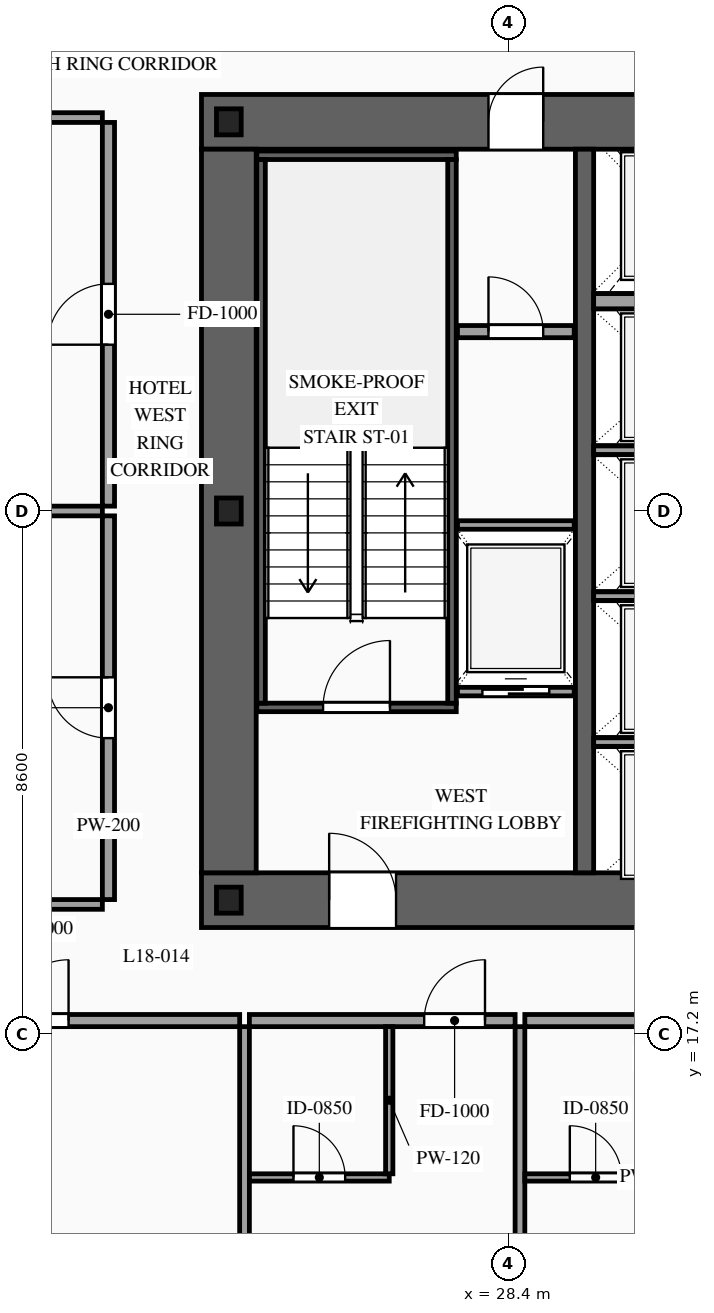
"""IFC4 building model, lengths in metres.
Left out: names, types, materials, properties, quantities, classifications, styles, units other than length and angle.
Written with IfcOpenShell. Run it as: python <this file> out.ifc"""

import sys

from ifc_helpers import new_model, si_unit, direction, frame, frame_2d, origin, origin_2d, place, context, subcontext, project, spatial, rectangle, i_section, extrude, source, transform, mapped, element, fill, save


model = new_model("IFC4")
c1 = context("Model", 3, precision=1e-05, world=origin(), true_north=direction((0.0, 1.0)))
c2 = subcontext(c1, "Body", "Model", "MODEL_VIEW")
j1 = project(units=[si_unit("LENGTHUNIT", "METRE"), si_unit("PLANEANGLEUNIT", "RADIAN")], contexts=[c1])
p1 = place(None, origin())
s1 = spatial("IfcSite", under=j1, at=p1, CompositionType="ELEMENT")
p2 = place(p1, origin())
s2 = spatial("IfcBuilding", under=s1, at=p2, CompositionType="ELEMENT")
p3 = place(p2, frame((0.0, 0.0, 71.2)))
s3 = spatial("IfcBuildingStorey", under=s2, at=p3, CompositionType="ELEMENT", Elevation=71.2)
p4 = place(p3, frame((23.35, 19.4, 0.0), z_axis=(0.0, 0.0, 1.0), x_axis=(1.0, 0.0, 0.0)))
e1 = element("IfcWall", 1, at=p4, inside=s3, PredefinedType="SHEAR", context=c2, shape_type="SweptSolid", body=[
    extrude(rectangle(XDim=27.3, YDim=0.9, at=frame_2d((13.65, 0.0))), origin(), (0.0, 0.0, 1.0), 3.6),
])
p5 = place(p4, frame((2.1, 0.0, 0.0)))
e2 = element("IfcOpeningElement", 2, at=p5, cuts=e1, PredefinedType="OPENING", context=c2, shape_type="SweptSolid", body=[
    extrude(rectangle(XDim=1.1, YDim=2.2, at=frame_2d((0.55, 1.1))), frame((0.0, 0.465, 0.0), z_axis=(0.0, -1.0, 0.0), x_axis=(1.0, 0.0, 0.0)), (0.0, 0.0, 1.0), 0.93),
])
p6 = place(p4, frame((10.0, 0.0, 0.0)))
e3 = element("IfcOpeningElement", 3, at=p6, cuts=e1, PredefinedType="OPENING", context=c2, shape_type="SweptSolid", body=[
    extrude(rectangle(XDim=1.1, YDim=2.2, at=frame_2d((0.55, 1.1))), frame((0.0, 0.465, 0.0), z_axis=(0.0, -1.0, 0.0), x_axis=(1.0, 0.0, 0.0)), (0.0, 0.0, 1.0), 0.93),
])
p7 = place(p4, frame((23.2, 0.0, 0.0)))
e4 = element("IfcOpeningElement", 4, at=p7, cuts=e1, PredefinedType="OPENING", context=c2, shape_type="SweptSolid", body=[
    extrude(rectangle(XDim=1.1, YDim=2.2, at=frame_2d((0.55, 1.1))), frame((0.0, 0.465, 0.0), z_axis=(0.0, -1.0, 0.0), x_axis=(1.0, 0.0, 0.0)), (0.0, 0.0, 1.0), 0.93),
])
p8 = place(p4, frame((19.82, 0.0, 0.0)))
e5 = element("IfcOpeningElement", 5, at=p8, cuts=e1, PredefinedType="OPENING", context=c2, shape_type="SweptSolid", body=[
    extrude(rectangle(XDim=0.9, YDim=2.15, at=frame_2d((0.45, 1.075))), frame((0.0, 0.465, 0.0), z_axis=(0.0, -1.0, 0.0), x_axis=(1.0, 0.0, 0.0)), (0.0, 0.0, 1.0), 0.93),
])
p9 = place(p4, frame((18.38, 0.0, 0.0)))
e6 = element("IfcOpeningElement", 6, at=p9, cuts=e1, PredefinedType="OPENING", context=c2, shape_type="SweptSolid", body=[
    extrude(rectangle(XDim=0.9, YDim=2.15, at=frame_2d((0.45, 1.075))), frame((0.0, 0.465, 0.0), z_axis=(0.0, -1.0, 0.0), x_axis=(1.0, 0.0, 0.0)), (0.0, 0.0, 1.0), 0.93),
])
p10 = place(p3, frame((23.35, 32.2, 0.0), z_axis=(0.0, 0.0, 1.0), x_axis=(1.0, 0.0, 0.0)))
e7 = element("IfcWall", 7, at=p10, inside=s3, PredefinedType="SHEAR", context=c2, shape_type="SweptSolid", body=[
    extrude(rectangle(XDim=27.3, YDim=0.9, at=frame_2d((13.65, 0.0))), origin(), (0.0, 0.0, 1.0), 3.6),
])
p11 = place(p10, frame((4.72, 0.0, 0.0)))
e8 = element("IfcOpeningElement", 8, at=p11, cuts=e7, PredefinedType="OPENING", context=c2, shape_type="SweptSolid", body=[
    extrude(rectangle(XDim=0.9, YDim=2.15, at=frame_2d((0.45, 1.075))), frame((0.0, 0.465, 0.0), z_axis=(0.0, -1.0, 0.0), x_axis=(1.0, 0.0, 0.0)), (0.0, 0.0, 1.0), 0.93),
])
p12 = place(p10, frame((10.0, 0.0, 0.0)))
e9 = element("IfcOpeningElement", 9, at=p12, cuts=e7, PredefinedType="OPENING", context=c2, shape_type="SweptSolid", body=[
    extrude(rectangle(XDim=1.1, YDim=2.2, at=frame_2d((0.55, 1.1))), frame((0.0, 0.465, 0.0), z_axis=(0.0, -1.0, 0.0), x_axis=(1.0, 0.0, 0.0)), (0.0, 0.0, 1.0), 0.93),
])
p13 = place(p10, frame((15.85, 0.0, 0.0)))
e10 = element("IfcOpeningElement", 10, at=p13, cuts=e7, PredefinedType="OPENING", context=c2, shape_type="SweptSolid", body=[
    extrude(rectangle(XDim=1.1, YDim=2.2, at=frame_2d((0.55, 1.1))), frame((0.0, 0.465, 0.0), z_axis=(0.0, -1.0, 0.0), x_axis=(1.0, 0.0, 0.0)), (0.0, 0.0, 1.0), 0.93),
])
p14 = place(p10, frame((18.38, 0.0, 0.0)))
e11 = element("IfcOpeningElement", 11, at=p14, cuts=e7, PredefinedType="OPENING", context=c2, shape_type="SweptSolid", body=[
    extrude(rectangle(XDim=0.9, YDim=2.15, at=frame_2d((0.45, 1.075))), frame((0.0, 0.465, 0.0), z_axis=(0.0, -1.0, 0.0), x_axis=(1.0, 0.0, 0.0)), (0.0, 0.0, 1.0), 0.93),
])
p15 = place(p10, frame((19.82, 0.0, 0.0)))
e12 = element("IfcOpeningElement", 12, at=p15, cuts=e7, PredefinedType="OPENING", context=c2, shape_type="SweptSolid", body=[
    extrude(rectangle(XDim=0.9, YDim=2.15, at=frame_2d((0.45, 1.075))), frame((0.0, 0.465, 0.0), z_axis=(0.0, -1.0, 0.0), x_axis=(1.0, 0.0, 0.0)), (0.0, 0.0, 1.0), 0.93),
])
m1 = source(origin(), c2, "Body", "SweptSolid", [
    extrude(rectangle(XDim=11.9, YDim=0.9, at=frame_2d((5.95, 0.0))), origin(), (0.0, 0.0, 1.0), 3.6),
])
p16 = place(p3, frame((23.8, 19.85, 0.0), z_axis=(0.0, 0.0, 1.0), x_axis=(0.0, 1.0, 0.0)))
e13 = element("IfcWall", 13, at=p16, inside=s3, PredefinedType="SHEAR", context=c2, shape_type="MappedRepresentation", body=[
    mapped(m1, transform((0.0, 0.0, 0.0), scale=1.0)),
])
m2 = source(origin(), c2, "Body", "SweptSolid", [
    extrude(rectangle(XDim=11.9, YDim=0.3, at=frame_2d((5.95, 0.0))), origin(), (0.0, 0.0, 1.0), 3.6),
])
p17 = place(p3, frame((29.65, 19.85, 0.0), z_axis=(0.0, 0.0, 1.0), x_axis=(0.0, 1.0, 0.0)))
e14 = element("IfcWall", 14, at=p17, inside=s3, PredefinedType="SOLIDWALL", context=c2, shape_type="MappedRepresentation", body=[
    mapped(m2, transform((0.0, 0.0, 0.0), scale=1.0)),
])
m3 = source(origin(), c2, "Body", "SweptSolid", [
    extrude(i_section(OverallWidth=0.407, OverallDepth=0.428, WebThickness=0.02, FlangeThickness=0.035, at=origin_2d()), origin(), (0.0, 0.0, 1.0), 3.6),
])
for number, where, z_axis, x_axis in (
    (15, (23.8, 19.4, 0.0), (0.0, 0.0, 1.0), (1.0, 0.0, 0.0)),
    (16, (23.8, 25.8, 0.0), (0.0, 0.0, 1.0), (1.0, 0.0, 0.0)),
    (17, (23.8, 32.2, 0.0), (0.0, 0.0, 1.0), (1.0, 0.0, 0.0)),
):
    element("IfcColumn", number, at=place(p3, frame(where, z_axis=z_axis, x_axis=x_axis)), inside=s3, PredefinedType="COLUMN", context=c2, shape_type="MappedRepresentation", body=[
        mapped(m3, transform((0.0, 0.0, 0.0), scale=1.0)),
    ])
p18 = place(p3, frame((27.56, 22.83, 0.0), z_axis=(0.0, 0.0, 1.0), x_axis=(1.0, 0.0, 0.0)))
e18 = element("IfcWall", 18, at=p18, inside=s3, PredefinedType="SOLIDWALL", context=c2, shape_type="SweptSolid", body=[
    extrude(rectangle(XDim=1.92, YDim=0.14, at=frame_2d((0.96, 0.0))), origin(), (0.0, 0.0, 1.0), 3.38),
])
p19 = place(p18, frame((0.41, 0.0, 0.0)))
e19 = element("IfcOpeningElement", 19, at=p19, cuts=e18, PredefinedType="OPENING", context=c2, shape_type="SweptSolid", body=[
    extrude(rectangle(XDim=1.1, YDim=2.2, at=frame_2d((0.55, 1.1))), frame((0.0, 0.085, 0.0), z_axis=(0.0, -1.0, 0.0), x_axis=(1.0, 0.0, 0.0)), (0.0, 0.0, 1.0), 0.17),
])
m4 = source(origin(), c2, "Body", "SweptSolid", [
    extrude(rectangle(XDim=1.92, YDim=0.14, at=frame_2d((0.96, 0.0))), origin(), (0.0, 0.0, 1.0), 3.38),
])
p20 = place(p3, frame((27.56, 25.57, 0.0), z_axis=(0.0, 0.0, 1.0), x_axis=(1.0, 0.0, 0.0)))
e20 = element("IfcWall", 20, at=p20, inside=s3, PredefinedType="SOLIDWALL", context=c2, shape_type="MappedRepresentation", body=[
    mapped(m4, transform((0.0, 0.0, 0.0), scale=1.0)),
])
m5 = source(origin(), c2, "Body", "SweptSolid", [
    extrude(rectangle(XDim=2.5, YDim=0.14, at=frame_2d((1.25, 0.0))), origin(), (0.0, 0.0, 1.0), 3.38),
])
for number, where, z_axis, x_axis in (
    (21, (29.8, 22.0, 0.0), (0.0, 0.0, 1.0), (1.0, 0.0, 0.0)),
    (22, (29.8, 24.4, 0.0), (0.0, 0.0, 1.0), (1.0, 0.0, 0.0)),
    (23, (29.8, 26.8, 0.0), (0.0, 0.0, 1.0), (1.0, 0.0, 0.0)),
):
    element("IfcWall", number, at=place(p3, frame(where, z_axis=z_axis, x_axis=x_axis)), inside=s3, PredefinedType="SOLIDWALL", context=c2, shape_type="MappedRepresentation", body=[
        mapped(m5, transform((0.0, 0.0, 0.0), scale=1.0)),
    ])
m6 = source(origin(), c2, "Body", "SweptSolid", [
    extrude(rectangle(XDim=2.5, YDim=0.25, at=frame_2d((1.25, 0.0))), origin(), (0.0, 0.0, 1.0), 3.38),
])
p21 = place(p3, frame((29.8, 29.25, 0.0), z_axis=(0.0, 0.0, 1.0), x_axis=(1.0, 0.0, 0.0)))
e24 = element("IfcWall", 24, at=p21, inside=s3, PredefinedType="SOLIDWALL", context=c2, shape_type="MappedRepresentation", body=[
    mapped(m6, transform((0.0, 0.0, 0.0), scale=1.0)),
])
p22 = place(p3, frame((24.26, 22.57, 0.0), z_axis=(0.0, 0.0, 1.0), x_axis=(1.0, 0.0, 0.0)))
e25 = element("IfcWall", 25, at=p22, inside=s3, PredefinedType="SOLIDWALL", context=c2, shape_type="SweptSolid", body=[
    extrude(rectangle(XDim=3.28, YDim=0.14, at=frame_2d((1.64, 0.0))), origin(), (0.0, 0.0, 1.0), 3.38),
])
p23 = place(p22, frame((1.09, 0.0, 0.0)))
e26 = element("IfcOpeningElement", 26, at=p23, cuts=e25, PredefinedType="OPENING", context=c2, shape_type="SweptSolid", body=[
    extrude(rectangle(XDim=1.1, YDim=2.2, at=frame_2d((0.55, 1.1))), frame((0.0, 0.085, 0.0), z_axis=(0.0, -1.0, 0.0), x_axis=(1.0, 0.0, 0.0)), (0.0, 0.0, 1.0), 0.17),
])
m7 = source(origin(), c2, "Body", "SweptSolid", [
    extrude(rectangle(XDim=3.28, YDim=0.14, at=frame_2d((1.64, 0.0))), origin(), (0.0, 0.0, 1.0), 3.38),
])
p24 = place(p3, frame((24.26, 31.65, 0.0), z_axis=(0.0, 0.0, 1.0), x_axis=(1.0, 0.0, 0.0)))
e27 = element("IfcWall", 27, at=p24, inside=s3, PredefinedType="SOLIDWALL", context=c2, shape_type="MappedRepresentation", body=[
    mapped(m7, transform((0.0, 0.0, 0.0), scale=1.0)),
])
m8 = source(origin(), c2, "Body", "SweptSolid", [
    extrude(rectangle(XDim=8.94, YDim=0.14, at=frame_2d((4.47, 0.0))), origin(), (0.0, 0.0, 1.0), 3.38),
])
for number, where, z_axis, x_axis in (
    (28, (24.33, 22.64, 0.0), (0.0, 0.0, 1.0), (0.0, 1.0, 0.0)),
    (29, (27.47, 22.64, 0.0), (0.0, 0.0, 1.0), (0.0, 1.0, 0.0)),
):
    element("IfcWall", number, at=place(p3, frame(where, z_axis=z_axis, x_axis=x_axis)), inside=s3, PredefinedType="SOLIDWALL", context=c2, shape_type="MappedRepresentation", body=[
        mapped(m8, transform((0.0, 0.0, 0.0), scale=1.0)),
    ])
p25 = place(p3, frame((27.56, 28.75, 0.0), z_axis=(0.0, 0.0, 1.0), x_axis=(1.0, 0.0, 0.0)))
e30 = element("IfcWall", 30, at=p25, inside=s3, PredefinedType="PARTITIONING", context=c2, shape_type="SweptSolid", body=[
    extrude(rectangle(XDim=1.92, YDim=0.2, at=frame_2d((0.96, 0.0))), origin(), (0.0, 0.0, 1.0), 3.38),
])
p26 = place(p25, frame((0.51, 0.0, 0.0)))
e31 = element("IfcOpeningElement", 31, at=p26, cuts=e30, PredefinedType="OPENING", context=c2, shape_type="SweptSolid", body=[
    extrude(rectangle(XDim=0.9, YDim=2.15, at=frame_2d((0.45, 1.075))), frame((0.0, 0.115, 0.0), z_axis=(0.0, -1.0, 0.0), x_axis=(1.0, 0.0, 0.0)), (0.0, 0.0, 1.0), 0.23),
])
p27 = place(p3, frame((14.94, 17.42, 0.0), z_axis=(0.0, 0.0, 1.0), x_axis=(1.0, 0.0, 0.0)))
e32 = element("IfcWall", 32, at=p27, inside=s3, PredefinedType="PARTITIONING", context=c2, shape_type="SweptSolid", body=[
    extrude(rectangle(XDim=9.038, YDim=0.2, at=frame_2d((4.519, 0.0))), origin(), (0.0, 0.0, 1.0), 3.38),
])
p28 = place(p27, frame((5.224, 0.0, 0.0)))
e33 = element("IfcOpeningElement", 33, at=p28, cuts=e32, PredefinedType="OPENING", context=c2, shape_type="SweptSolid", body=[
    extrude(rectangle(XDim=1.0, YDim=2.2, at=frame_2d((0.5, 1.1))), frame((0.0, 0.115, 0.0), z_axis=(0.0, -1.0, 0.0), x_axis=(1.0, 0.0, 0.0)), (0.0, 0.0, 1.0), 0.23),
])
m9 = source(origin(), c2, "Body", "SweptSolid", [
    extrude(rectangle(XDim=16.47, YDim=0.16, at=frame_2d((8.235, 0.0))), origin(), (0.0, 0.0, 1.0), 3.38),
])
p29 = place(p3, frame((24.058, 0.85, 0.0), z_axis=(0.0, 0.0, 1.0), x_axis=(0.0, 1.0, 0.0)))
e34 = element("IfcWall", 34, at=p29, inside=s3, PredefinedType="PARTITIONING", context=c2, shape_type="MappedRepresentation", body=[
    mapped(m9, transform((0.0, 0.0, 0.0), scale=1.0)),
])
p30 = place(p3, frame((24.138, 17.42, 0.0), z_axis=(0.0, 0.0, 1.0), x_axis=(1.0, 0.0, 0.0)))
e35 = element("IfcWall", 35, at=p30, inside=s3, PredefinedType="PARTITIONING", context=c2, shape_type="SweptSolid", body=[
    extrude(rectangle(XDim=4.37, YDim=0.2, at=frame_2d((2.185, 0.0))), origin(), (0.0, 0.0, 1.0), 3.38),
])
p31 = place(p30, frame((2.875, 0.0, 0.0)))
e36 = element("IfcOpeningElement", 36, at=p31, cuts=e35, PredefinedType="OPENING", context=c2, shape_type="SweptSolid", body=[
    extrude(rectangle(XDim=1.0, YDim=2.2, at=frame_2d((0.5, 1.1))), frame((0.0, 0.115, 0.0), z_axis=(0.0, -1.0, 0.0), x_axis=(1.0, 0.0, 0.0)), (0.0, 0.0, 1.0), 0.23),
])
p32 = place(p3, frame((28.588, 0.85, 0.0), z_axis=(0.0, 0.0, 1.0), x_axis=(0.0, 1.0, 0.0)))
e37 = element("IfcWall", 37, at=p32, inside=s3, PredefinedType="PARTITIONING", context=c2, shape_type="MappedRepresentation", body=[
    mapped(m9, transform((0.0, 0.0, 0.0), scale=1.0)),
])
p33 = place(p3, frame((24.138, 14.84, 0.0), z_axis=(0.0, 0.0, 1.0), x_axis=(1.0, 0.0, 0.0)))
e38 = element("IfcWall", 38, at=p33, inside=s3, PredefinedType="PARTITIONING", context=c2, shape_type="SweptSolid", body=[
    extrude(rectangle(XDim=2.3, YDim=0.12, at=frame_2d((1.15, 0.0))), origin(), (0.0, 0.0, 1.0), 3.38),
])
p34 = place(p33, frame((0.725, 0.0, 0.0)))
e39 = element("IfcOpeningElement", 39, at=p34, cuts=e38, PredefinedType="OPENING", context=c2, shape_type="SweptSolid", body=[
    extrude(rectangle(XDim=0.85, YDim=2.1, at=frame_2d((0.425, 1.05))), frame((0.0, 0.075, 0.0), z_axis=(0.0, -1.0, 0.0), x_axis=(1.0, 0.0, 0.0)), (0.0, 0.0, 1.0), 0.15),
])
m10 = source(origin(), c2, "Body", "SweptSolid", [
    extrude(rectangle(XDim=2.42, YDim=0.12, at=frame_2d((1.21, 0.0))), origin(), (0.0, 0.0, 1.0), 3.38),
])
p35 = place(p3, frame((26.438, 14.9, 0.0), z_axis=(0.0, 0.0, 1.0), x_axis=(0.0, 1.0, 0.0)))
e40 = element("IfcWall", 40, at=p35, inside=s3, PredefinedType="PARTITIONING", context=c2, shape_type="MappedRepresentation", body=[
    mapped(m10, transform((0.0, 0.0, 0.0), scale=1.0)),
])
p36 = place(p3, frame((28.668, 17.42, 0.0), z_axis=(0.0, 0.0, 1.0), x_axis=(1.0, 0.0, 0.0)))
e41 = element("IfcWall", 41, at=p36, inside=s3, PredefinedType="PARTITIONING", context=c2, shape_type="SweptSolid", body=[
    extrude(rectangle(XDim=10.017, YDim=0.2, at=frame_2d((5.009, 0.0))), origin(), (0.0, 0.0, 1.0), 3.38),
])
p37 = place(p36, frame((5.714, 0.0, 0.0)))
e42 = element("IfcOpeningElement", 42, at=p37, cuts=e41, PredefinedType="OPENING", context=c2, shape_type="SweptSolid", body=[
    extrude(rectangle(XDim=1.0, YDim=2.2, at=frame_2d((0.5, 1.1))), frame((0.0, 0.115, 0.0), z_axis=(0.0, -1.0, 0.0), x_axis=(1.0, 0.0, 0.0)), (0.0, 0.0, 1.0), 0.23),
])
p38 = place(p3, frame((28.668, 14.84, 0.0), z_axis=(0.0, 0.0, 1.0), x_axis=(1.0, 0.0, 0.0)))
e43 = element("IfcWall", 43, at=p38, inside=s3, PredefinedType="PARTITIONING", context=c2, shape_type="SweptSolid", body=[
    extrude(rectangle(XDim=2.33, YDim=0.12, at=frame_2d((1.165, 0.0))), origin(), (0.0, 0.0, 1.0), 3.38),
])
p39 = place(p38, frame((0.74, 0.0, 0.0)))
e44 = element("IfcOpeningElement", 44, at=p39, cuts=e43, PredefinedType="OPENING", context=c2, shape_type="SweptSolid", body=[
    extrude(rectangle(XDim=0.85, YDim=2.1, at=frame_2d((0.425, 1.05))), frame((0.0, 0.075, 0.0), z_axis=(0.0, -1.0, 0.0), x_axis=(1.0, 0.0, 0.0)), (0.0, 0.0, 1.0), 0.15),
])
p40 = place(p3, frame((21.82, 19.41, 0.0), z_axis=(0.0, 0.0, 1.0), x_axis=(0.0, 1.0, 0.0)))
e45 = element("IfcWall", 45, at=p40, inside=s3, PredefinedType="PARTITIONING", context=c2, shape_type="SweptSolid", body=[
    extrude(rectangle(XDim=6.31, YDim=0.2, at=frame_2d((3.155, 0.0))), origin(), (0.0, 0.0, 1.0), 3.38),
])
p41 = place(p40, frame((2.655, 0.0, 0.0)))
e46 = element("IfcOpeningElement", 46, at=p41, cuts=e45, PredefinedType="OPENING", context=c2, shape_type="SweptSolid", body=[
    extrude(rectangle(XDim=1.0, YDim=2.2, at=frame_2d((0.5, 1.1))), frame((0.0, 0.115, 0.0), z_axis=(0.0, -1.0, 0.0), x_axis=(1.0, 0.0, 0.0)), (0.0, 0.0, 1.0), 0.23),
])
m11 = source(origin(), c2, "Body", "SweptSolid", [
    extrude(rectangle(XDim=9.67, YDim=0.16, at=frame_2d((4.835, 0.0))), origin(), (0.0, 0.0, 1.0), 2.575),
])
p42 = place(p3, frame((12.05, 25.8, 0.0), z_axis=(0.0, 0.0, 1.0), x_axis=(1.0, 0.0, 0.0)))
e47 = element("IfcWall", 47, at=p42, inside=s3, PredefinedType="PARTITIONING", context=c2, shape_type="MappedRepresentation", body=[
    mapped(m11, transform((0.0, 0.0, 0.0), scale=1.0)),
])
m12 = source(origin(), c2, "Body", "SweptSolid", [
    extrude(rectangle(XDim=9.67, YDim=0.16, at=frame_2d((4.835, 0.0))), origin(), (0.0, 0.0, 1.0), 2.875),
])
p43 = place(p3, frame((12.05, 19.33, 0.0), z_axis=(0.0, 0.0, 1.0), x_axis=(1.0, 0.0, 0.0)))
e48 = element("IfcWall", 48, at=p43, inside=s3, PredefinedType="PARTITIONING", context=c2, shape_type="MappedRepresentation", body=[
    mapped(m12, transform((0.0, 0.0, 0.0), scale=1.0)),
])
p44 = place(p3, frame((21.82, 25.88, 0.0), z_axis=(0.0, 0.0, 1.0), x_axis=(0.0, 1.0, 0.0)))
e49 = element("IfcWall", 49, at=p44, inside=s3, PredefinedType="PARTITIONING", context=c2, shape_type="SweptSolid", body=[
    extrude(rectangle(XDim=6.31, YDim=0.2, at=frame_2d((3.155, 0.0))), origin(), (0.0, 0.0, 1.0), 3.38),
])
p45 = place(p44, frame((2.655, 0.0, 0.0)))
e50 = element("IfcOpeningElement", 50, at=p45, cuts=e49, PredefinedType="OPENING", context=c2, shape_type="SweptSolid", body=[
    extrude(rectangle(XDim=1.0, YDim=2.2, at=frame_2d((0.5, 1.1))), frame((0.0, 0.115, 0.0), z_axis=(0.0, -1.0, 0.0), x_axis=(1.0, 0.0, 0.0)), (0.0, 0.0, 1.0), 0.23),
])
p46 = place(p3, frame((12.05, 32.27, 0.0), z_axis=(0.0, 0.0, 1.0), x_axis=(1.0, 0.0, 0.0)))
e51 = element("IfcWall", 51, at=p46, inside=s3, PredefinedType="PARTITIONING", context=c2, shape_type="MappedRepresentation", body=[
    mapped(m12, transform((0.0, 0.0, 0.0), scale=1.0)),
])
m13 = source(origin(), c2, "Body", "SweptSolid", [
    extrude(rectangle(XDim=1.1, YDim=2.2, at=frame_2d((0.55, 1.1))), frame((0.0, 0.025, 0.0), z_axis=(0.0, -1.0, 0.0), x_axis=(1.0, 0.0, 0.0)), (0.0, 0.0, 1.0), 0.05),
])
p47 = place(p19, origin())
e52 = element("IfcDoor", 52, at=p47, inside=s3, OperationType="SLIDING_TO_LEFT", PredefinedType="DOOR", context=c2, shape_type="MappedRepresentation", body=[
    mapped(m13, transform((0.0, 0.0, 0.0), scale=1.0)),
])
fill(e19, e52)
m14 = source(origin(), c2, "Body", "SweptSolid", [
    extrude(rectangle(XDim=1.1, YDim=2.2, at=frame_2d((0.55, 1.1))), frame((0.0, 0.025, 0.0), z_axis=(0.0, -1.0, 0.0), x_axis=(1.0, 0.0, 0.0)), (0.0, 0.0, 1.0), 0.05),
])
p48 = place(p23, origin())
e53 = element("IfcDoor", 53, at=p48, inside=s3, OperationType="SINGLE_SWING_RIGHT", PredefinedType="DOOR", context=c2, shape_type="MappedRepresentation", body=[
    mapped(m14, transform((0.0, 0.0, 0.0), scale=1.0)),
])
fill(e26, e53)
p49 = place(p5, origin())
e54 = element("IfcDoor", 54, at=p49, inside=s3, OperationType="SINGLE_SWING_LEFT", PredefinedType="DOOR", context=c2, shape_type="MappedRepresentation", body=[
    mapped(m14, transform((0.0, 0.0, 0.0), scale=1.0)),
])
fill(e2, e54)
m15 = source(origin(), c2, "Body", "SweptSolid", [
    extrude(rectangle(XDim=0.9, YDim=2.15, at=frame_2d((0.45, 1.075))), frame((0.0, 0.025, 0.0), z_axis=(0.0, -1.0, 0.0), x_axis=(1.0, 0.0, 0.0)), (0.0, 0.0, 1.0), 0.05),
])
p50 = place(p11, origin())
e55 = element("IfcDoor", 55, at=p50, inside=s3, OperationType="SINGLE_SWING_RIGHT", PredefinedType="DOOR", context=c2, shape_type="MappedRepresentation", body=[
    mapped(m15, transform((0.0, 0.0, 0.0), scale=1.0)),
])
fill(e8, e55)
p51 = place(p26, origin())
e56 = element("IfcDoor", 56, at=p51, inside=s3, OperationType="SINGLE_SWING_LEFT", PredefinedType="DOOR", context=c2, shape_type="MappedRepresentation", body=[
    mapped(m15, transform((0.0, 0.0, 0.0), scale=1.0)),
])
fill(e31, e56)
m16 = source(origin(), c2, "Body", "SweptSolid", [
    extrude(rectangle(XDim=1.0, YDim=2.2, at=frame_2d((0.5, 1.1))), frame((0.0, 0.025, 0.0), z_axis=(0.0, -1.0, 0.0), x_axis=(1.0, 0.0, 0.0)), (0.0, 0.0, 1.0), 0.05),
])
p52 = place(p28, origin())
e57 = element("IfcDoor", 57, at=p52, inside=s3, OperationType="SINGLE_SWING_RIGHT", PredefinedType="DOOR", context=c2, shape_type="MappedRepresentation", body=[
    mapped(m16, transform((0.0, 0.0, 0.0), scale=1.0)),
])
fill(e33, e57)
p53 = place(p31, origin())
e58 = element("IfcDoor", 58, at=p53, inside=s3, OperationType="SINGLE_SWING_RIGHT", PredefinedType="DOOR", context=c2, shape_type="MappedRepresentation", body=[
    mapped(m16, transform((0.0, 0.0, 0.0), scale=1.0)),
])
fill(e36, e58)
m17 = source(origin(), c2, "Body", "SweptSolid", [
    extrude(rectangle(XDim=0.85, YDim=2.1, at=frame_2d((0.425, 1.05))), frame((0.0, 0.025, 0.0), z_axis=(0.0, -1.0, 0.0), x_axis=(1.0, 0.0, 0.0)), (0.0, 0.0, 1.0), 0.05),
])
p54 = place(p34, origin())
e59 = element("IfcDoor", 59, at=p54, inside=s3, OperationType="SINGLE_SWING_LEFT", PredefinedType="DOOR", context=c2, shape_type="MappedRepresentation", body=[
    mapped(m17, transform((0.0, 0.0, 0.0), scale=1.0)),
])
fill(e39, e59)
p55 = place(p39, origin())
e60 = element("IfcDoor", 60, at=p55, inside=s3, OperationType="SINGLE_SWING_LEFT", PredefinedType="DOOR", context=c2, shape_type="MappedRepresentation", body=[
    mapped(m17, transform((0.0, 0.0, 0.0), scale=1.0)),
])
fill(e44, e60)
p56 = place(p41, origin())
e61 = element("IfcDoor", 61, at=p56, inside=s3, OperationType="SINGLE_SWING_RIGHT", PredefinedType="DOOR", context=c2, shape_type="MappedRepresentation", body=[
    mapped(m16, transform((0.0, 0.0, 0.0), scale=1.0)),
])
fill(e46, e61)
p57 = place(p45, origin())
e62 = element("IfcDoor", 62, at=p57, inside=s3, OperationType="SINGLE_SWING_LEFT", PredefinedType="DOOR", context=c2, shape_type="MappedRepresentation", body=[
    mapped(m16, transform((0.0, 0.0, 0.0), scale=1.0)),
])
fill(e50, e62)
save(model, sys.argv[1])
